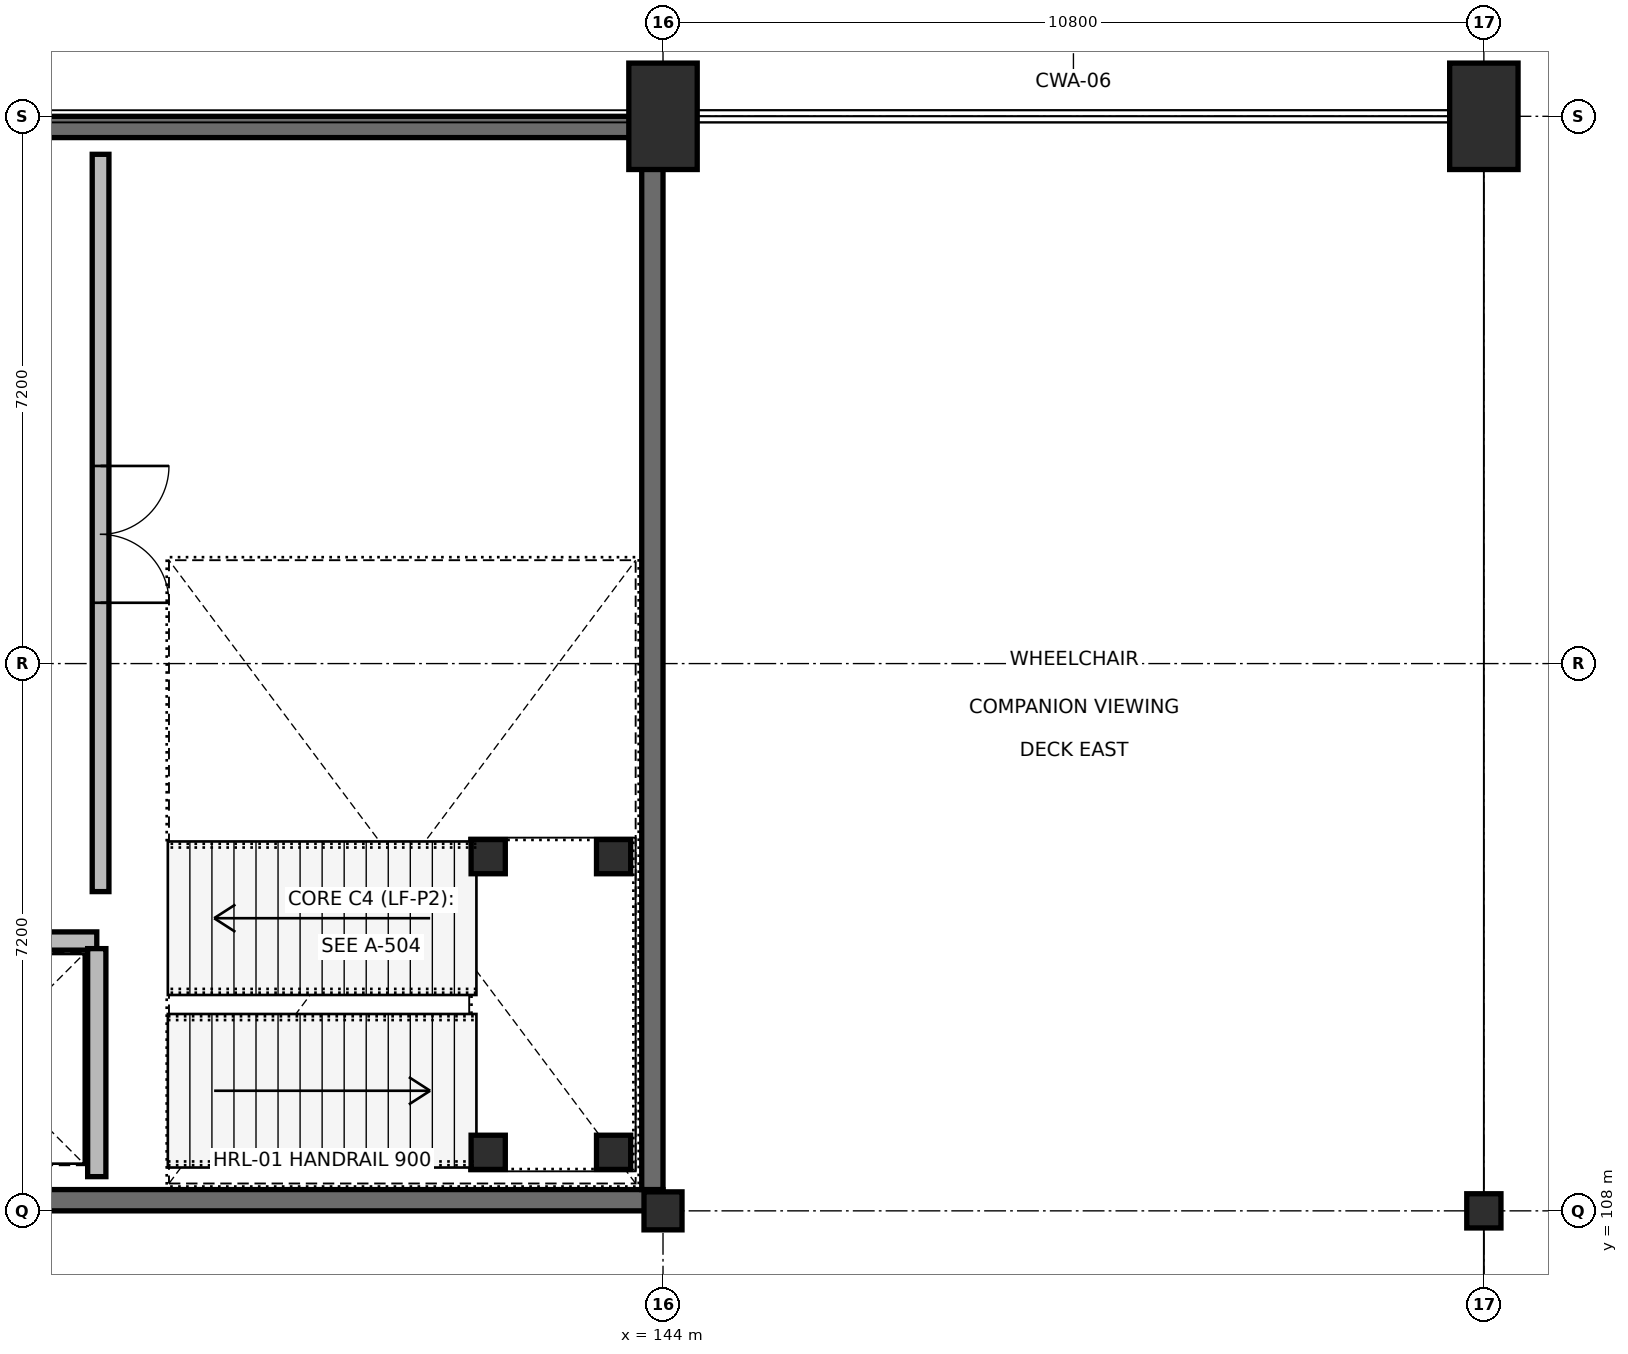
"""IFC4 building model, lengths in metres.
Left out: names, types, materials, properties, quantities, classifications, styles, units other than length and angle.
Written with IfcOpenShell. Run it as: python <this file> out.ifc"""

import sys

from ifc_helpers import new_model, si_unit, direction, frame, frame_2d, origin, origin_2d, place, context, subcontext, project, spatial, rectangle, extrude, element, fill, save


model = new_model("IFC4")
c1 = context("Model", 3, precision=1e-05, world=origin(), true_north=direction((0.0, 1.0)))
c2 = subcontext(c1, "Body", "Model", "MODEL_VIEW")
j1 = project(units=[si_unit("LENGTHUNIT", "METRE"), si_unit("PLANEANGLEUNIT", "RADIAN")], contexts=[c1])
p1 = place(None, origin())
s1 = spatial("IfcSite", under=j1, at=p1, CompositionType="ELEMENT")
p2 = place(p1, origin())
s2 = spatial("IfcBuilding", under=s1, at=p2, CompositionType="ELEMENT")
p3 = place(p2, frame((0.0, 0.0, 4.8)))
s3 = spatial("IfcBuildingStorey", under=s2, at=p3, CompositionType="ELEMENT", Elevation=4.8)
for number, where, z_axis, x_axis in (
    (1, (144.0, 122.4, 0.0), (0.0, 0.0, 1.0), (1.0, 0.0, 0.0)),
    (2, (154.8, 122.4, 0.0), (0.0, 0.0, 1.0), (1.0, 0.0, 0.0)),
):
    element("IfcColumn", number, at=place(p3, frame(where, z_axis=z_axis, x_axis=x_axis)), inside=s3, PredefinedType="COLUMN", context=c2, shape_type="SweptSolid", body=[
        extrude(rectangle(XDim=0.9, YDim=1.4, at=origin_2d()), origin(), (0.0, 0.0, 1.0), 4.8),
    ])
p4 = place(p3, frame((144.0, 108.0, 0.0), z_axis=(0.0, 0.0, 1.0), x_axis=(1.0, 0.0, 0.0)))
e3 = element("IfcColumn", 3, at=p4, inside=s3, PredefinedType="COLUMN", context=c2, shape_type="SweptSolid", body=[
    extrude(rectangle(XDim=0.5, YDim=0.5, at=origin_2d()), origin(), (0.0, 0.0, 1.0), 4.8),
])
p5 = place(p3, frame((154.8, 108.0, 0.0), z_axis=(0.0, 0.0, 1.0), x_axis=(1.0, 0.0, 0.0)))
e4 = element("IfcColumn", 4, at=p5, inside=s3, PredefinedType="COLUMN", context=c2, shape_type="SweptSolid", body=[
    extrude(rectangle(XDim=0.45, YDim=0.45, at=origin_2d()), origin(), (0.0, 0.0, 1.0), 4.8),
])
for number, where, z_axis, x_axis in (
    (5, (133.2, 108.14, 0.0), (0.0, 0.0, 1.0), (1.0, 0.0, 0.0)),
    (6, (133.2, 122.26, 0.0), (0.0, 0.0, 1.0), (1.0, 0.0, 0.0)),
):
    element("IfcWall", number, at=place(p3, frame(where, z_axis=z_axis, x_axis=x_axis)), inside=s3, PredefinedType="SHEAR", context=c2, shape_type="SweptSolid", body=[
        extrude(rectangle(XDim=10.8, YDim=0.28, at=frame_2d((5.4, 0.0))), origin(), (0.0, 0.0, 1.0), 4.8),
    ])
p6 = place(p3, frame((143.86, 108.28, 0.0), z_axis=(0.0, 0.0, 1.0), x_axis=(0.0, 1.0, 0.0)))
e7 = element("IfcWall", 7, at=p6, inside=s3, PredefinedType="SHEAR", context=c2, shape_type="SweptSolid", body=[
    extrude(rectangle(XDim=13.84, YDim=0.28, at=frame_2d((6.92, 0.0))), origin(), (0.0, 0.0, 1.0), 4.8),
])
p7 = place(p3, frame((136.6, 112.2, 0.0), z_axis=(0.0, 0.0, 1.0), x_axis=(0.0, 1.0, 0.0)))
e8 = element("IfcWall", 8, at=p7, inside=s3, PredefinedType="PARTITIONING", context=c2, shape_type="SweptSolid", body=[
    extrude(rectangle(XDim=9.7, YDim=0.22, at=frame_2d((4.85, 0.0))), origin(), (0.0, 0.0, 1.0), 4.505),
])
p8 = place(p7, frame((3.8, 0.0, 0.0)))
e9 = element("IfcOpeningElement", 9, at=p8, cuts=e8, PredefinedType="OPENING", context=c2, shape_type="SweptSolid", body=[
    extrude(rectangle(XDim=1.8, YDim=2.2, at=frame_2d((0.9, 1.1))), frame((0.0, 0.12, 0.0), z_axis=(0.0, -1.0, 0.0), x_axis=(1.0, 0.0, 0.0)), (0.0, 0.0, 1.0), 0.24),
])
p9 = place(p3, frame((133.53, 111.55, 0.0), z_axis=(0.0, 0.0, 1.0), x_axis=(1.0, 0.0, 0.0)))
e10 = element("IfcWall", 10, at=p9, inside=s3, PredefinedType="SOLIDWALL", context=c2, shape_type="SweptSolid", body=[
    extrude(rectangle(XDim=3.02, YDim=0.24, at=frame_2d((1.51, 0.0))), origin(), (0.0, 0.0, 1.0), 3.785),
])
p10 = place(p9, frame((0.96, 0.0, 0.0)))
e11 = element("IfcOpeningElement", 11, at=p10, cuts=e10, PredefinedType="OPENING", context=c2, shape_type="SweptSolid", body=[
    extrude(rectangle(XDim=1.1, YDim=2.15, at=frame_2d((0.55, 1.075))), frame((0.0, 0.13, 0.0), z_axis=(0.0, -1.0, 0.0), x_axis=(1.0, 0.0, 0.0)), (0.0, 0.0, 1.0), 0.26),
])
p11 = place(p3, frame((136.55, 108.45, 0.0), z_axis=(0.0, 0.0, 1.0), x_axis=(0.0, 1.0, 0.0)))
e12 = element("IfcWall", 12, at=p11, inside=s3, PredefinedType="SOLIDWALL", context=c2, shape_type="SweptSolid", body=[
    extrude(rectangle(XDim=3.0, YDim=0.24, at=frame_2d((1.5, 0.0))), origin(), (0.0, 0.0, 1.0), 4.505),
])
for number, where, z_axis, x_axis in (
    (13, (143.35, 108.77, 0.0), (0.0, 0.0, 1.0), (1.0, 0.0, 0.0)),
    (14, (141.7, 108.77, 0.0), (0.0, 0.0, 1.0), (1.0, 0.0, 0.0)),
    (15, (143.35, 112.66, 0.0), (0.0, 0.0, 1.0), (1.0, 0.0, 0.0)),
    (16, (141.7, 112.66, 0.0), (0.0, 0.0, 1.0), (1.0, 0.0, 0.0)),
):
    element("IfcColumn", number, at=place(p3, frame(where, z_axis=z_axis, x_axis=x_axis)), inside=s3, PredefinedType="COLUMN", context=c2, shape_type="SweptSolid", body=[
        extrude(rectangle(XDim=0.45, YDim=0.45, at=origin_2d()), origin(), (0.0, 0.0, 1.0), 4.8),
    ])
p12 = place(p8, origin())
e17 = element("IfcDoor", 17, at=p12, inside=s3, OperationType="DOUBLE_DOOR_SINGLE_SWING", PredefinedType="DOOR", context=c2, shape_type="SweptSolid", body=[
    extrude(rectangle(XDim=1.8, YDim=2.2, at=frame_2d((0.9, 1.1))), frame((0.0, 0.025, 0.0), z_axis=(0.0, -1.0, 0.0), x_axis=(1.0, 0.0, 0.0)), (0.0, 0.0, 1.0), 0.05),
])
fill(e9, e17)
save(model, sys.argv[1])
